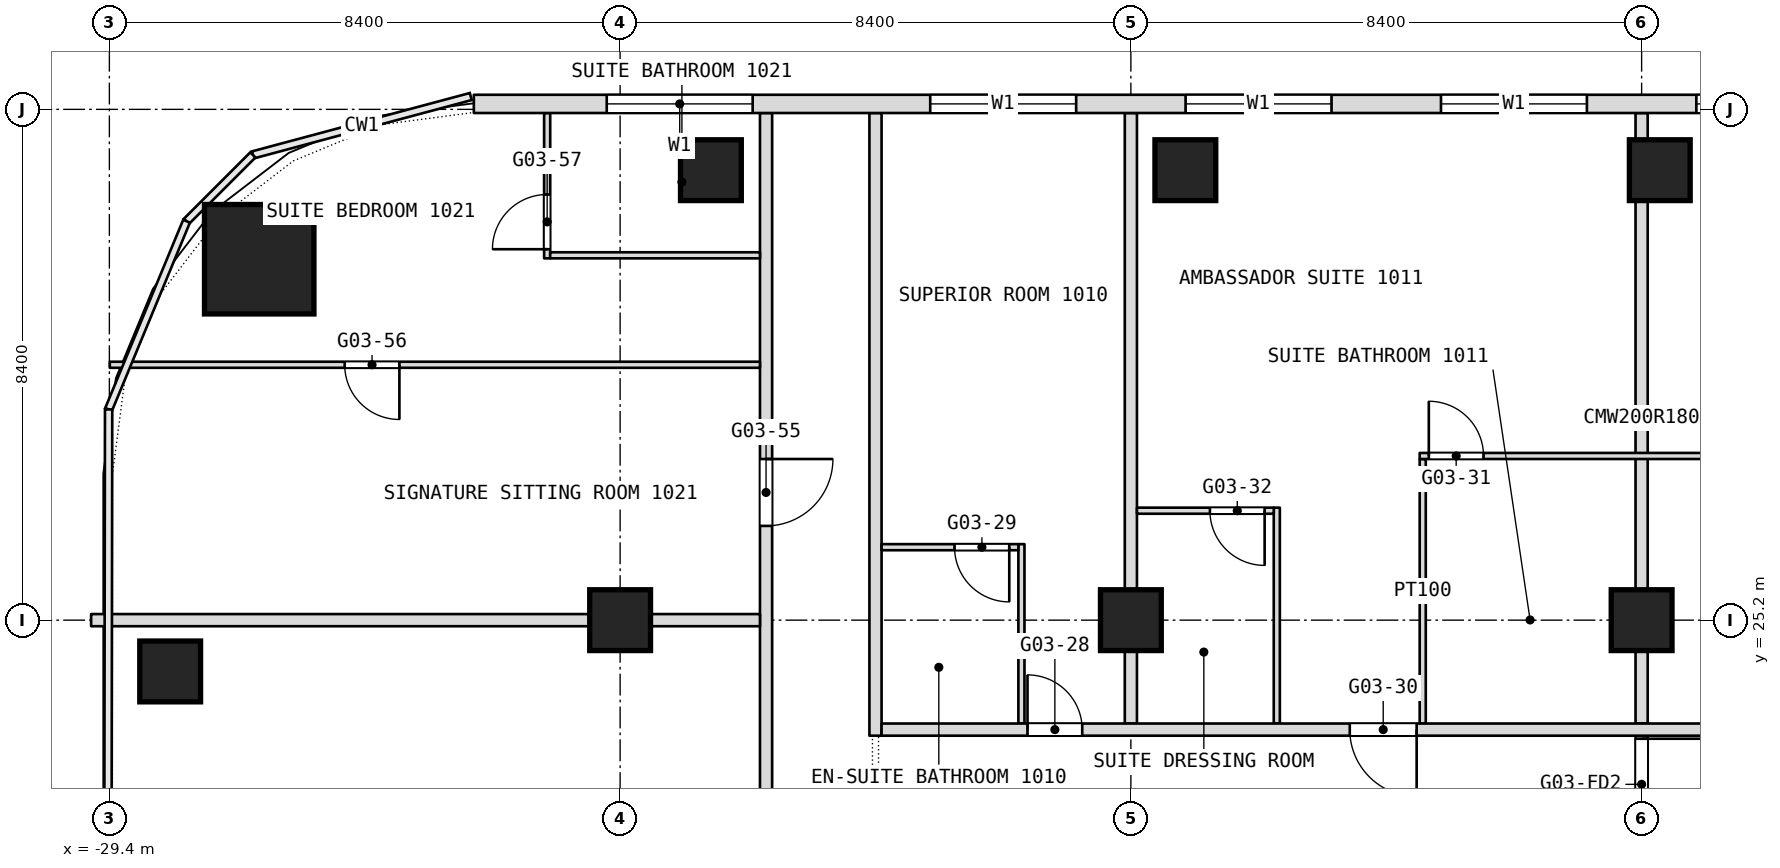
"""IFC4 building model, lengths in metres.
Left out: names, types, materials, properties, quantities, classifications, styles, units other than length and angle.
Written with IfcOpenShell. Run it as: python <this file> out.ifc"""

import sys

from ifc_helpers import new_model, si_unit, direction, frame, frame_2d, origin, origin_2d, place, context, subcontext, project, spatial, rectangle, extrude, element, fill, save


model = new_model("IFC4")
c1 = context("Model", 3, precision=1e-05, world=origin(), true_north=direction((0.0, 1.0)))
c2 = subcontext(c1, "Body", "Model", "MODEL_VIEW")
j1 = project(units=[si_unit("LENGTHUNIT", "METRE"), si_unit("PLANEANGLEUNIT", "RADIAN")], contexts=[c1])
p1 = place(None, origin())
s1 = spatial("IfcSite", under=j1, at=p1, CompositionType="ELEMENT")
p2 = place(p1, origin())
s2 = spatial("IfcBuilding", under=s1, at=p2, CompositionType="ELEMENT")
p3 = place(p2, frame((0.0, 0.0, 50.9)))
s3 = spatial("IfcBuildingStorey", under=s2, at=p3, CompositionType="ELEMENT", Elevation=50.9)
p4 = place(p3, frame((-26.936, 31.135, 0.0), z_axis=(0.0, 0.0, 1.0), x_axis=(1.0, 0.0, 0.0)))
e1 = element("IfcColumn", 1, at=p4, inside=s3, PredefinedType="COLUMN", context=c2, shape_type="SweptSolid", body=[
    extrude(rectangle(XDim=1.8, YDim=1.8, at=origin_2d()), origin(), (0.0, 0.0, 1.0), 3.6),
])
for number, where, z_axis, x_axis in (
    (2, (-21.0, 25.2, 0.0), (0.0, 0.0, 1.0), (1.0, 0.0, 0.0)),
    (3, (-12.6, 25.2, 0.0), (0.0, 0.0, 1.0), (1.0, 0.0, 0.0)),
    (4, (-4.2, 25.2, 0.0), (0.0, 0.0, 1.0), (1.0, 0.0, 0.0)),
    (5, (-28.4, 24.356, 0.0), (0.0, 0.0, 1.0), (1.0, 0.0, 0.0)),
    (6, (-19.507, 32.6, 0.0), (0.0, 0.0, 1.0), (1.0, 0.0, 0.0)),
    (7, (-11.704, 32.6, 0.0), (0.0, 0.0, 1.0), (1.0, 0.0, 0.0)),
    (8, (-3.901, 32.6, 0.0), (0.0, 0.0, 1.0), (1.0, 0.0, 0.0)),
):
    element("IfcColumn", number, at=place(p3, frame(where, z_axis=z_axis, x_axis=x_axis)), inside=s3, PredefinedType="COLUMN", context=c2, shape_type="SweptSolid", body=[
        extrude(rectangle(XDim=1.0, YDim=1.0, at=origin_2d()), origin(), (0.0, 0.0, 1.0), 3.6),
    ])
p5 = place(p3, frame((-4.2, 16.8, 0.0), z_axis=(0.0, 0.0, 1.0), x_axis=(0.0, 1.0, 0.0)))
e9 = element("IfcWall", 9, at=p5, inside=s3, PredefinedType="PARTITIONING", context=c2, shape_type="SweptSolid", body=[
    extrude(rectangle(XDim=6.7, YDim=0.2, at=frame_2d((3.35, 0.0))), origin(), (0.0, 0.0, 1.0), 3.34),
])
p6 = place(p5, frame((0.15, 0.0, 0.0)))
e10 = element("IfcOpeningElement", 10, at=p6, cuts=e9, PredefinedType="OPENING", context=c2, shape_type="SweptSolid", body=[
    extrude(rectangle(XDim=1.5, YDim=2.1, at=frame_2d((0.75, 1.05))), frame((0.0, 0.1, 0.0), z_axis=(0.0, -1.0, 0.0), x_axis=(1.0, 0.0, 0.0)), (0.0, 0.0, 1.0), 0.2),
])
p7 = place(p5, frame((4.95, 0.0, 0.0)))
e11 = element("IfcOpeningElement", 11, at=p7, cuts=e9, PredefinedType="OPENING", context=c2, shape_type="SweptSolid", body=[
    extrude(rectangle(XDim=1.5, YDim=2.1, at=frame_2d((0.75, 1.05))), frame((0.0, 0.1, 0.0), z_axis=(0.0, -1.0, 0.0), x_axis=(1.0, 0.0, 0.0)), (0.0, 0.0, 1.0), 0.2),
])
p8 = place(p3, frame((-4.2, 23.5, 0.0), z_axis=(0.0, 0.0, 1.0), x_axis=(0.0, 1.0, 0.0)))
e12 = element("IfcWall", 12, at=p8, inside=s3, PredefinedType="PARTITIONING", context=c2, shape_type="SweptSolid", body=[
    extrude(rectangle(XDim=10.04, YDim=0.2, at=frame_2d((5.02, 0.0))), origin(), (0.0, 0.0, 1.0), 3.34),
])
p9 = place(p3, frame((-7.8, 23.5, 0.0), z_axis=(0.0, 0.0, 1.0), x_axis=(0.0, 1.0, 0.0)))
e13 = element("IfcWall", 13, at=p9, inside=s3, PredefinedType="PARTITIONING", context=c2, shape_type="SweptSolid", body=[
    extrude(rectangle(XDim=4.35, YDim=0.1, at=frame_2d((2.175, 0.0))), origin(), (0.0, 0.0, 1.0), 3.34),
])
p10 = place(p3, frame((-10.2, 23.5, 0.0), z_axis=(0.0, 0.0, 1.0), x_axis=(0.0, 1.0, 0.0)))
e14 = element("IfcWall", 14, at=p10, inside=s3, PredefinedType="PARTITIONING", context=c2, shape_type="SweptSolid", body=[
    extrude(rectangle(XDim=3.55, YDim=0.1, at=frame_2d((1.775, 0.0))), origin(), (0.0, 0.0, 1.0), 3.34),
])
p11 = place(p3, frame((-12.6, 23.5, 0.0), z_axis=(0.0, 0.0, 1.0), x_axis=(0.0, 1.0, 0.0)))
e15 = element("IfcWall", 15, at=p11, inside=s3, PredefinedType="PARTITIONING", context=c2, shape_type="SweptSolid", body=[
    extrude(rectangle(XDim=10.04, YDim=0.2, at=frame_2d((5.02, 0.0))), origin(), (0.0, 0.0, 1.0), 3.34),
])
p12 = place(p3, frame((-14.4, 23.5, 0.0), z_axis=(0.0, 0.0, 1.0), x_axis=(0.0, 1.0, 0.0)))
e16 = element("IfcWall", 16, at=p12, inside=s3, PredefinedType="PARTITIONING", context=c2, shape_type="SweptSolid", body=[
    extrude(rectangle(XDim=2.95, YDim=0.1, at=frame_2d((1.475, 0.0))), origin(), (0.0, 0.0, 1.0), 3.34),
])
p13 = place(p3, frame((-16.8, 23.3, 0.0), z_axis=(0.0, 0.0, 1.0), x_axis=(0.0, 1.0, 0.0)))
e17 = element("IfcWall", 17, at=p13, inside=s3, PredefinedType="PARTITIONING", context=c2, shape_type="SweptSolid", body=[
    extrude(rectangle(XDim=10.24, YDim=0.2, at=frame_2d((5.12, 0.0))), origin(), (0.0, 0.0, 1.0), 3.34),
])
p14 = place(p3, frame((-18.6, 18.5, 0.0), z_axis=(0.0, 0.0, 1.0), x_axis=(0.0, 1.0, 0.0)))
e18 = element("IfcWall", 18, at=p14, inside=s3, PredefinedType="PARTITIONING", context=c2, shape_type="SweptSolid", body=[
    extrude(rectangle(XDim=15.04, YDim=0.2, at=frame_2d((7.52, 0.0))), origin(), (0.0, 0.0, 1.0), 3.34),
])
p15 = place(p14, frame((8.25, 0.0, 0.0)))
e19 = element("IfcOpeningElement", 19, at=p15, cuts=e18, PredefinedType="OPENING", context=c2, shape_type="SweptSolid", body=[
    extrude(rectangle(XDim=1.1, YDim=2.1, at=frame_2d((0.55, 1.05))), frame((0.0, 0.1, 0.0), z_axis=(0.0, -1.0, 0.0), x_axis=(1.0, 0.0, 0.0)), (0.0, 0.0, 1.0), 0.2),
])
p16 = place(p3, frame((-22.2, 31.15, 0.0), z_axis=(0.0, 0.0, 1.0), x_axis=(0.0, 1.0, 0.0)))
e20 = element("IfcWall", 20, at=p16, inside=s3, PredefinedType="PARTITIONING", context=c2, shape_type="SweptSolid", body=[
    extrude(rectangle(XDim=2.39, YDim=0.1, at=frame_2d((1.195, 0.0))), origin(), (0.0, 0.0, 1.0), 3.34),
])
p17 = place(p16, frame((0.15, 0.0, 0.0)))
e21 = element("IfcOpeningElement", 21, at=p17, cuts=e20, PredefinedType="OPENING", context=c2, shape_type="SweptSolid", body=[
    extrude(rectangle(XDim=0.9, YDim=2.1, at=frame_2d((0.45, 1.05))), frame((0.0, 0.05, 0.0), z_axis=(0.0, -1.0, 0.0), x_axis=(1.0, 0.0, 0.0)), (0.0, 0.0, 1.0), 0.1),
])
p18 = place(p3, frame((-16.7, 23.4, 0.0), z_axis=(0.0, 0.0, 1.0), x_axis=(1.0, 0.0, 0.0)))
e22 = element("IfcWall", 22, at=p18, inside=s3, PredefinedType="PARTITIONING", context=c2, shape_type="SweptSolid", body=[
    extrude(rectangle(XDim=21.0, YDim=0.2, at=frame_2d((10.5, 0.0))), origin(), (0.0, 0.0, 1.0), 3.34),
])
p19 = place(p18, frame((2.4, 0.0, 0.0)))
e23 = element("IfcOpeningElement", 23, at=p19, cuts=e22, PredefinedType="OPENING", context=c2, shape_type="SweptSolid", body=[
    extrude(rectangle(XDim=0.9, YDim=2.1, at=frame_2d((0.45, 1.05))), frame((0.0, 0.1, 0.0), z_axis=(0.0, -1.0, 0.0), x_axis=(1.0, 0.0, 0.0)), (0.0, 0.0, 1.0), 0.2),
])
p20 = place(p18, frame((7.7, 0.0, 0.0)))
e24 = element("IfcOpeningElement", 24, at=p20, cuts=e22, PredefinedType="OPENING", context=c2, shape_type="SweptSolid", body=[
    extrude(rectangle(XDim=1.1, YDim=2.1, at=frame_2d((0.55, 1.05))), frame((0.0, 0.1, 0.0), z_axis=(0.0, -1.0, 0.0), x_axis=(1.0, 0.0, 0.0)), (0.0, 0.0, 1.0), 0.2),
])
p21 = place(p18, frame((16.2, 0.0, 0.0)))
e25 = element("IfcOpeningElement", 25, at=p21, cuts=e22, PredefinedType="OPENING", context=c2, shape_type="SweptSolid", body=[
    extrude(rectangle(XDim=1.1, YDim=2.1, at=frame_2d((0.55, 1.05))), frame((0.0, 0.1, 0.0), z_axis=(0.0, -1.0, 0.0), x_axis=(1.0, 0.0, 0.0)), (0.0, 0.0, 1.0), 0.2),
])
p22 = place(p3, frame((-29.7, 25.2, 0.0), z_axis=(0.0, 0.0, 1.0), x_axis=(1.0, 0.0, 0.0)))
e26 = element("IfcWall", 26, at=p22, inside=s3, PredefinedType="PARTITIONING", context=c2, shape_type="SweptSolid", body=[
    extrude(rectangle(XDim=11.0, YDim=0.2, at=frame_2d((5.5, 0.0))), origin(), (0.0, 0.0, 1.0), 2.84),
])
p23 = place(p3, frame((-16.7, 26.4, 0.0), z_axis=(0.0, 0.0, 1.0), x_axis=(1.0, 0.0, 0.0)))
e27 = element("IfcWall", 27, at=p23, inside=s3, PredefinedType="PARTITIONING", context=c2, shape_type="SweptSolid", body=[
    extrude(rectangle(XDim=2.25, YDim=0.1, at=frame_2d((1.125, 0.0))), origin(), (0.0, 0.0, 1.0), 3.34),
])
p24 = place(p23, frame((1.2, 0.0, 0.0)))
e28 = element("IfcOpeningElement", 28, at=p24, cuts=e27, PredefinedType="OPENING", context=c2, shape_type="SweptSolid", body=[
    extrude(rectangle(XDim=0.9, YDim=2.1, at=frame_2d((0.45, 1.05))), frame((0.0, 0.05, 0.0), z_axis=(0.0, -1.0, 0.0), x_axis=(1.0, 0.0, 0.0)), (0.0, 0.0, 1.0), 0.1),
])
p25 = place(p3, frame((-12.5, 27.0, 0.0), z_axis=(0.0, 0.0, 1.0), x_axis=(1.0, 0.0, 0.0)))
e29 = element("IfcWall", 29, at=p25, inside=s3, PredefinedType="PARTITIONING", context=c2, shape_type="SweptSolid", body=[
    extrude(rectangle(XDim=2.25, YDim=0.1, at=frame_2d((1.125, 0.0))), origin(), (0.0, 0.0, 1.0), 3.34),
])
p26 = place(p25, frame((1.2, 0.0, 0.0)))
e30 = element("IfcOpeningElement", 30, at=p26, cuts=e29, PredefinedType="OPENING", context=c2, shape_type="SweptSolid", body=[
    extrude(rectangle(XDim=0.9, YDim=2.1, at=frame_2d((0.45, 1.05))), frame((0.0, 0.05, 0.0), z_axis=(0.0, -1.0, 0.0), x_axis=(1.0, 0.0, 0.0)), (0.0, 0.0, 1.0), 0.1),
])
p27 = place(p3, frame((-7.85, 27.9, 0.0), z_axis=(0.0, 0.0, 1.0), x_axis=(1.0, 0.0, 0.0)))
e31 = element("IfcWall", 31, at=p27, inside=s3, PredefinedType="PARTITIONING", context=c2, shape_type="SweptSolid", body=[
    extrude(rectangle(XDim=7.2, YDim=0.1, at=frame_2d((3.6, 0.0))), origin(), (0.0, 0.0, 1.0), 3.34),
])
p28 = place(p27, frame((0.15, 0.0, 0.0)))
e32 = element("IfcOpeningElement", 32, at=p28, cuts=e31, PredefinedType="OPENING", context=c2, shape_type="SweptSolid", body=[
    extrude(rectangle(XDim=0.9, YDim=2.1, at=frame_2d((0.45, 1.05))), frame((0.0, 0.05, 0.0), z_axis=(0.0, -1.0, 0.0), x_axis=(1.0, 0.0, 0.0)), (0.0, 0.0, 1.0), 0.1),
])
p29 = place(p27, frame((6.15, 0.0, 0.0)))
e33 = element("IfcOpeningElement", 33, at=p29, cuts=e31, PredefinedType="OPENING", context=c2, shape_type="SweptSolid", body=[
    extrude(rectangle(XDim=0.9, YDim=2.1, at=frame_2d((0.45, 1.05))), frame((0.0, 0.05, 0.0), z_axis=(0.0, -1.0, 0.0), x_axis=(1.0, 0.0, 0.0)), (0.0, 0.0, 1.0), 0.1),
])
p30 = place(p3, frame((-29.393, 29.4, 0.0), z_axis=(0.0, 0.0, 1.0), x_axis=(1.0, 0.0, 0.0)))
e34 = element("IfcWall", 34, at=p30, inside=s3, PredefinedType="PARTITIONING", context=c2, shape_type="SweptSolid", body=[
    extrude(rectangle(XDim=10.693, YDim=0.1, at=frame_2d((5.347, 0.0))), origin(), (0.0, 0.0, 1.0), 3.34),
])
p31 = place(p30, frame((3.863, 0.0, 0.0)))
e35 = element("IfcOpeningElement", 35, at=p31, cuts=e34, PredefinedType="OPENING", context=c2, shape_type="SweptSolid", body=[
    extrude(rectangle(XDim=0.9, YDim=2.1, at=frame_2d((0.45, 1.05))), frame((0.0, 0.05, 0.0), z_axis=(0.0, -1.0, 0.0), x_axis=(1.0, 0.0, 0.0)), (0.0, 0.0, 1.0), 0.1),
])
p32 = place(p3, frame((-22.15, 31.2, 0.0), z_axis=(0.0, 0.0, 1.0), x_axis=(1.0, 0.0, 0.0)))
e36 = element("IfcWall", 36, at=p32, inside=s3, PredefinedType="PARTITIONING", context=c2, shape_type="SweptSolid", body=[
    extrude(rectangle(XDim=3.45, YDim=0.1, at=frame_2d((1.725, 0.0))), origin(), (0.0, 0.0, 1.0), 3.34),
])
p33 = place(p3, frame((23.406, 33.69, 0.0), z_axis=(0.0, 0.0, 1.0), x_axis=(-1.0, 0.0, 0.0)))
e37 = element("IfcWall", 37, at=p33, inside=s3, PredefinedType="NOTDEFINED", context=c2, shape_type="SweptSolid", body=[
    extrude(rectangle(XDim=46.812, YDim=0.3, at=frame_2d((23.406, 0.0))), origin(), (0.0, 0.0, 1.0), 3.6),
])
p34 = place(p33, frame((2.186, 0.0, 0.9)))
e38 = element("IfcOpeningElement", 38, at=p34, cuts=e37, PredefinedType="OPENING", context=c2, shape_type="SweptSolid", body=[
    extrude(rectangle(XDim=2.4, YDim=2.1, at=frame_2d((1.2, 1.05))), frame((0.0, 0.15, 0.0), z_axis=(0.0, -1.0, 0.0), x_axis=(1.0, 0.0, 0.0)), (0.0, 0.0, 1.0), 0.3),
])
p35 = place(p33, frame((7.506, 0.0, 0.9)))
e39 = element("IfcOpeningElement", 39, at=p35, cuts=e37, PredefinedType="OPENING", context=c2, shape_type="SweptSolid", body=[
    extrude(rectangle(XDim=2.4, YDim=2.1, at=frame_2d((1.2, 1.05))), frame((0.0, 0.15, 0.0), z_axis=(0.0, -1.0, 0.0), x_axis=(1.0, 0.0, 0.0)), (0.0, 0.0, 1.0), 0.3),
])
p36 = place(p33, frame((11.706, 0.0, 0.9)))
e40 = element("IfcOpeningElement", 40, at=p36, cuts=e37, PredefinedType="OPENING", context=c2, shape_type="SweptSolid", body=[
    extrude(rectangle(XDim=2.4, YDim=2.1, at=frame_2d((1.2, 1.05))), frame((0.0, 0.15, 0.0), z_axis=(0.0, -1.0, 0.0), x_axis=(1.0, 0.0, 0.0)), (0.0, 0.0, 1.0), 0.3),
])
p37 = place(p33, frame((15.906, 0.0, 0.9)))
e41 = element("IfcOpeningElement", 41, at=p37, cuts=e37, PredefinedType="OPENING", context=c2, shape_type="SweptSolid", body=[
    extrude(rectangle(XDim=2.4, YDim=2.1, at=frame_2d((1.2, 1.05))), frame((0.0, 0.15, 0.0), z_axis=(0.0, -1.0, 0.0), x_axis=(1.0, 0.0, 0.0)), (0.0, 0.0, 1.0), 0.3),
])
p38 = place(p33, frame((20.106, 0.0, 0.9)))
e42 = element("IfcOpeningElement", 42, at=p38, cuts=e37, PredefinedType="OPENING", context=c2, shape_type="SweptSolid", body=[
    extrude(rectangle(XDim=2.4, YDim=2.1, at=frame_2d((1.2, 1.05))), frame((0.0, 0.15, 0.0), z_axis=(0.0, -1.0, 0.0), x_axis=(1.0, 0.0, 0.0)), (0.0, 0.0, 1.0), 0.3),
])
p39 = place(p33, frame((24.306, 0.0, 0.9)))
e43 = element("IfcOpeningElement", 43, at=p39, cuts=e37, PredefinedType="OPENING", context=c2, shape_type="SweptSolid", body=[
    extrude(rectangle(XDim=2.4, YDim=2.1, at=frame_2d((1.2, 1.05))), frame((0.0, 0.15, 0.0), z_axis=(0.0, -1.0, 0.0), x_axis=(1.0, 0.0, 0.0)), (0.0, 0.0, 1.0), 0.3),
])
p40 = place(p33, frame((28.506, 0.0, 0.9)))
e44 = element("IfcOpeningElement", 44, at=p40, cuts=e37, PredefinedType="OPENING", context=c2, shape_type="SweptSolid", body=[
    extrude(rectangle(XDim=2.4, YDim=2.1, at=frame_2d((1.2, 1.05))), frame((0.0, 0.15, 0.0), z_axis=(0.0, -1.0, 0.0), x_axis=(1.0, 0.0, 0.0)), (0.0, 0.0, 1.0), 0.3),
])
p41 = place(p33, frame((32.706, 0.0, 0.9)))
e45 = element("IfcOpeningElement", 45, at=p41, cuts=e37, PredefinedType="OPENING", context=c2, shape_type="SweptSolid", body=[
    extrude(rectangle(XDim=2.4, YDim=2.1, at=frame_2d((1.2, 1.05))), frame((0.0, 0.15, 0.0), z_axis=(0.0, -1.0, 0.0), x_axis=(1.0, 0.0, 0.0)), (0.0, 0.0, 1.0), 0.3),
])
p42 = place(p33, frame((36.906, 0.0, 0.9)))
e46 = element("IfcOpeningElement", 46, at=p42, cuts=e37, PredefinedType="OPENING", context=c2, shape_type="SweptSolid", body=[
    extrude(rectangle(XDim=2.4, YDim=2.1, at=frame_2d((1.2, 1.05))), frame((0.0, 0.15, 0.0), z_axis=(0.0, -1.0, 0.0), x_axis=(1.0, 0.0, 0.0)), (0.0, 0.0, 1.0), 0.3),
])
p43 = place(p33, frame((42.226, 0.0, 0.9)))
e47 = element("IfcOpeningElement", 47, at=p43, cuts=e37, PredefinedType="OPENING", context=c2, shape_type="SweptSolid", body=[
    extrude(rectangle(XDim=2.4, YDim=2.1, at=frame_2d((1.2, 1.05))), frame((0.0, 0.15, 0.0), z_axis=(0.0, -1.0, 0.0), x_axis=(1.0, 0.0, 0.0)), (0.0, 0.0, 1.0), 0.3),
])
p44 = place(p15, origin())
e48 = element("IfcDoor", 48, at=p44, inside=s3, OperationType="SINGLE_SWING_RIGHT", PredefinedType="DOOR", context=c2, shape_type="SweptSolid", body=[
    extrude(rectangle(XDim=1.1, YDim=2.1, at=frame_2d((0.55, 1.05))), frame((0.0, 0.025, 0.0), z_axis=(0.0, -1.0, 0.0), x_axis=(1.0, 0.0, 0.0)), (0.0, 0.0, 1.0), 0.05),
])
fill(e19, e48)
p45 = place(p17, origin())
e49 = element("IfcDoor", 49, at=p45, inside=s3, OperationType="SINGLE_SWING_RIGHT", PredefinedType="DOOR", context=c2, shape_type="SweptSolid", body=[
    extrude(rectangle(XDim=0.9, YDim=2.1, at=frame_2d((0.45, 1.05))), frame((0.0, 0.025, 0.0), z_axis=(0.0, -1.0, 0.0), x_axis=(1.0, 0.0, 0.0)), (0.0, 0.0, 1.0), 0.05),
])
fill(e21, e49)
p46 = place(p19, origin())
e50 = element("IfcDoor", 50, at=p46, inside=s3, OperationType="SINGLE_SWING_LEFT", PredefinedType="DOOR", context=c2, shape_type="SweptSolid", body=[
    extrude(rectangle(XDim=0.9, YDim=2.1, at=frame_2d((0.45, 1.05))), frame((0.0, 0.025, 0.0), z_axis=(0.0, -1.0, 0.0), x_axis=(1.0, 0.0, 0.0)), (0.0, 0.0, 1.0), 0.05),
])
fill(e23, e50)
p47 = place(p20, origin())
e51 = element("IfcDoor", 51, at=p47, inside=s3, OperationType="SINGLE_SWING_RIGHT", PredefinedType="DOOR", context=c2, shape_type="SweptSolid", body=[
    extrude(rectangle(XDim=1.1, YDim=2.1, at=frame_2d((0.55, 1.05))), frame((0.0, 0.025, 0.0), z_axis=(0.0, -1.0, 0.0), x_axis=(1.0, 0.0, 0.0)), (0.0, 0.0, 1.0), 0.05),
])
fill(e24, e51)
p48 = place(p24, origin())
e52 = element("IfcDoor", 52, at=p48, inside=s3, OperationType="SINGLE_SWING_LEFT", PredefinedType="DOOR", context=c2, shape_type="SweptSolid", body=[
    extrude(rectangle(XDim=0.9, YDim=2.1, at=frame_2d((0.45, 1.05))), frame((0.0, 0.025, 0.0), z_axis=(0.0, -1.0, 0.0), x_axis=(1.0, 0.0, 0.0)), (0.0, 0.0, 1.0), 0.05),
])
fill(e28, e52)
p49 = place(p26, origin())
e53 = element("IfcDoor", 53, at=p49, inside=s3, OperationType="SINGLE_SWING_LEFT", PredefinedType="DOOR", context=c2, shape_type="SweptSolid", body=[
    extrude(rectangle(XDim=0.9, YDim=2.1, at=frame_2d((0.45, 1.05))), frame((0.0, 0.025, 0.0), z_axis=(0.0, -1.0, 0.0), x_axis=(1.0, 0.0, 0.0)), (0.0, 0.0, 1.0), 0.05),
])
fill(e30, e53)
p50 = place(p28, origin())
e54 = element("IfcDoor", 54, at=p50, inside=s3, OperationType="SINGLE_SWING_RIGHT", PredefinedType="DOOR", context=c2, shape_type="SweptSolid", body=[
    extrude(rectangle(XDim=0.9, YDim=2.1, at=frame_2d((0.45, 1.05))), frame((0.0, 0.025, 0.0), z_axis=(0.0, -1.0, 0.0), x_axis=(1.0, 0.0, 0.0)), (0.0, 0.0, 1.0), 0.05),
])
fill(e32, e54)
p51 = place(p31, origin())
e55 = element("IfcDoor", 55, at=p51, inside=s3, OperationType="SINGLE_SWING_LEFT", PredefinedType="DOOR", context=c2, shape_type="SweptSolid", body=[
    extrude(rectangle(XDim=0.9, YDim=2.1, at=frame_2d((0.45, 1.05))), frame((0.0, 0.025, 0.0), z_axis=(0.0, -1.0, 0.0), x_axis=(1.0, 0.0, 0.0)), (0.0, 0.0, 1.0), 0.05),
])
fill(e35, e55)
p52 = place(p39, origin())
e56 = element("IfcWindow", 56, at=p52, inside=s3, PartitioningType="SINGLE_PANEL", PredefinedType="WINDOW", context=c2, shape_type="SweptSolid", body=[
    extrude(rectangle(XDim=2.4, YDim=2.1, at=frame_2d((1.2, 1.05))), frame((0.0, 0.03, 0.0), z_axis=(0.0, -1.0, 0.0), x_axis=(1.0, 0.0, 0.0)), (0.0, 0.0, 1.0), 0.06),
])
fill(e43, e56)
p53 = place(p40, origin())
e57 = element("IfcWindow", 57, at=p53, inside=s3, PartitioningType="SINGLE_PANEL", PredefinedType="WINDOW", context=c2, shape_type="SweptSolid", body=[
    extrude(rectangle(XDim=2.4, YDim=2.1, at=frame_2d((1.2, 1.05))), frame((0.0, 0.03, 0.0), z_axis=(0.0, -1.0, 0.0), x_axis=(1.0, 0.0, 0.0)), (0.0, 0.0, 1.0), 0.06),
])
fill(e44, e57)
p54 = place(p41, origin())
e58 = element("IfcWindow", 58, at=p54, inside=s3, PartitioningType="SINGLE_PANEL", PredefinedType="WINDOW", context=c2, shape_type="SweptSolid", body=[
    extrude(rectangle(XDim=2.4, YDim=2.1, at=frame_2d((1.2, 1.05))), frame((0.0, 0.03, 0.0), z_axis=(0.0, -1.0, 0.0), x_axis=(1.0, 0.0, 0.0)), (0.0, 0.0, 1.0), 0.06),
])
fill(e45, e58)
p55 = place(p42, origin())
e59 = element("IfcWindow", 59, at=p55, inside=s3, PartitioningType="SINGLE_PANEL", PredefinedType="WINDOW", context=c2, shape_type="SweptSolid", body=[
    extrude(rectangle(XDim=2.4, YDim=2.1, at=frame_2d((1.2, 1.05))), frame((0.0, 0.03, 0.0), z_axis=(0.0, -1.0, 0.0), x_axis=(1.0, 0.0, 0.0)), (0.0, 0.0, 1.0), 0.06),
])
fill(e46, e59)
p56 = place(p43, origin())
e60 = element("IfcWindow", 60, at=p56, inside=s3, PartitioningType="SINGLE_PANEL", PredefinedType="WINDOW", context=c2, shape_type="SweptSolid", body=[
    extrude(rectangle(XDim=2.4, YDim=2.1, at=frame_2d((1.2, 1.05))), frame((0.0, 0.03, 0.0), z_axis=(0.0, -1.0, 0.0), x_axis=(1.0, 0.0, 0.0)), (0.0, 0.0, 1.0), 0.06),
])
fill(e47, e60)
p57 = place(p7, origin())
e61 = element("IfcDoor", 61, at=p57, inside=s3, OperationType="DOUBLE_DOOR_DOUBLE_SWING", PredefinedType="DOOR", context=c2, shape_type="SweptSolid", body=[
    extrude(rectangle(XDim=1.5, YDim=2.1, at=frame_2d((0.75, 1.05))), frame((0.0, 0.025, 0.0), z_axis=(0.0, -1.0, 0.0), x_axis=(1.0, 0.0, 0.0)), (0.0, 0.0, 1.0), 0.05),
])
fill(e11, e61)
save(model, sys.argv[1])
